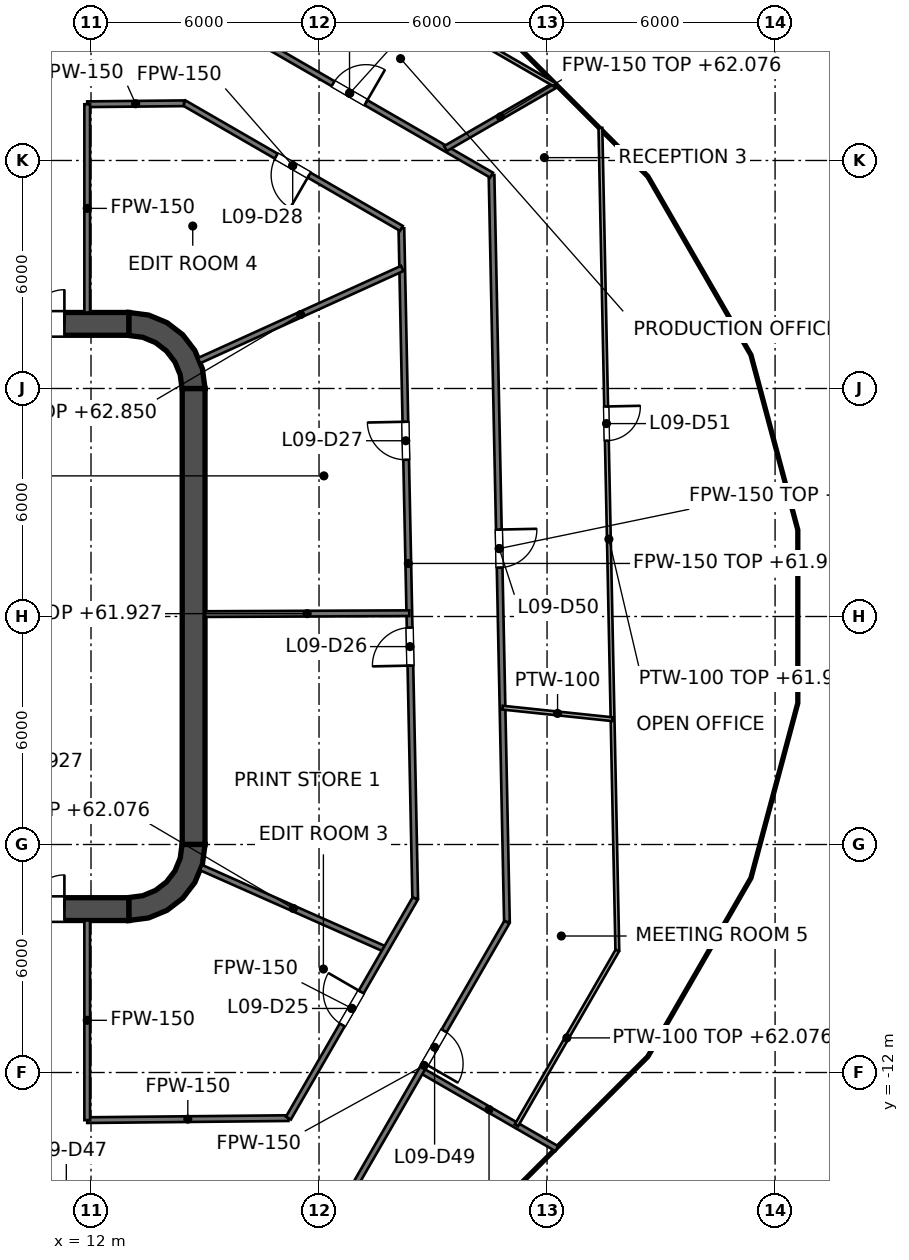
"""IFC4 building model, lengths in metres.
Left out: names, types, materials, properties, quantities, classifications, styles, units other than length and angle.
Written with IfcOpenShell. Run it as: python <this file> out.ifc"""

import sys

from ifc_helpers import new_model, si_unit, direction, frame, frame_2d, origin, place, context, subcontext, project, spatial, polyline, rectangle, outline, extrude, element, fill, save


model = new_model("IFC4")
c1 = context("Model", 3, precision=1e-05, world=origin(), true_north=direction((0.0, 1.0)))
c2 = subcontext(c1, "Body", "Model", "MODEL_VIEW")
j1 = project(units=[si_unit("LENGTHUNIT", "METRE"), si_unit("PLANEANGLEUNIT", "RADIAN")], contexts=[c1])
p1 = place(None, origin())
s1 = spatial("IfcSite", under=j1, at=p1, CompositionType="ELEMENT")
p2 = place(p1, origin())
s2 = spatial("IfcBuilding", under=s1, at=p2, CompositionType="ELEMENT")
p3 = place(p2, frame((0.0, 0.0, 58.8)))
s3 = spatial("IfcBuildingStorey", under=s2, at=p3, CompositionType="ELEMENT", Elevation=58.8)
p4 = place(p3, frame((-13.0, 7.7, 0.0), z_axis=(0.0, 0.0, 1.0), x_axis=(1.0, 0.0, 0.0)))
e1 = element("IfcWall", 1, at=p4, inside=s3, PredefinedType="SHEAR", context=c2, shape_type="SweptSolid", body=[
    extrude(rectangle(XDim=26.0, YDim=0.6, at=frame_2d((13.0, 0.0))), origin(), (0.0, 0.0, 1.0), 4.2),
])
p5 = place(p4, frame((1.7, 0.0, 0.0)))
e2 = element("IfcOpeningElement", 2, at=p5, cuts=e1, PredefinedType="OPENING", context=c2, shape_type="SweptSolid", body=[
    extrude(rectangle(XDim=1.8, YDim=2.1, at=frame_2d((0.9, 1.05))), frame((0.0, 0.3, 0.0), z_axis=(0.0, -1.0, 0.0), x_axis=(1.0, 0.0, 0.0)), (0.0, 0.0, 1.0), 0.6),
])
p6 = place(p4, frame((22.5, 0.0, 0.0)))
e3 = element("IfcOpeningElement", 3, at=p6, cuts=e1, PredefinedType="OPENING", context=c2, shape_type="SweptSolid", body=[
    extrude(rectangle(XDim=1.8, YDim=2.1, at=frame_2d((0.9, 1.05))), frame((0.0, 0.3, 0.0), z_axis=(0.0, -1.0, 0.0), x_axis=(1.0, 0.0, 0.0)), (0.0, 0.0, 1.0), 0.6),
])
p7 = place(p3, frame((-13.0, -7.7, 0.0), z_axis=(0.0, 0.0, 1.0), x_axis=(1.0, 0.0, 0.0)))
e4 = element("IfcWall", 4, at=p7, inside=s3, PredefinedType="SHEAR", context=c2, shape_type="SweptSolid", body=[
    extrude(rectangle(XDim=26.0, YDim=0.6, at=frame_2d((13.0, 0.0))), origin(), (0.0, 0.0, 1.0), 4.2),
])
p8 = place(p7, frame((1.7, 0.0, 0.0)))
e5 = element("IfcOpeningElement", 5, at=p8, cuts=e4, PredefinedType="OPENING", context=c2, shape_type="SweptSolid", body=[
    extrude(rectangle(XDim=1.8, YDim=2.1, at=frame_2d((0.9, 1.05))), frame((0.0, 0.3, 0.0), z_axis=(0.0, -1.0, 0.0), x_axis=(1.0, 0.0, 0.0)), (0.0, 0.0, 1.0), 0.6),
])
p9 = place(p7, frame((22.5, 0.0, 0.0)))
e6 = element("IfcOpeningElement", 6, at=p9, cuts=e4, PredefinedType="OPENING", context=c2, shape_type="SweptSolid", body=[
    extrude(rectangle(XDim=1.8, YDim=2.1, at=frame_2d((0.9, 1.05))), frame((0.0, 0.3, 0.0), z_axis=(0.0, -1.0, 0.0), x_axis=(1.0, 0.0, 0.0)), (0.0, 0.0, 1.0), 0.6),
])
p10 = place(p3, frame((14.7, -6.0, 0.0), z_axis=(0.0, 0.0, 1.0), x_axis=(0.0, 1.0, 0.0)))
e7 = element("IfcWall", 7, at=p10, inside=s3, PredefinedType="SHEAR", context=c2, shape_type="SweptSolid", body=[
    extrude(rectangle(XDim=12.0, YDim=0.6, at=frame_2d((6.0, 0.0))), origin(), (0.0, 0.0, 1.0), 4.2),
])
p11 = place(p3, origin())
e8 = element("IfcWall", 8, at=p11, inside=s3, PredefinedType="SHEAR", context=c2, shape_type="SweptSolid", body=[
    extrude(outline(polyline([(13.0, 8.0), (13.0, 7.395), (13.361, 7.347), (13.698, 7.208), (13.986, 6.986), (14.208, 6.698), (14.347, 6.361), (14.395, 6.0), (15.0, 6.0), (14.932, 6.518), (14.732, 7.0), (14.414, 7.414), (14.0, 7.732), (13.518, 7.932), (13.0, 8.0)])), origin(), (0.0, 0.0, 1.0), 4.2),
])
e9 = element("IfcWall", 9, at=p11, inside=s3, PredefinedType="SHEAR", context=c2, shape_type="SweptSolid", body=[
    extrude(outline(polyline([(15.0, -6.0), (14.395, -6.0), (14.347, -6.361), (14.208, -6.698), (13.986, -6.986), (13.698, -7.208), (13.361, -7.347), (13.0, -7.395), (13.0, -8.0), (13.518, -7.932), (14.0, -7.732), (14.414, -7.414), (14.732, -7.0), (14.932, -6.518), (15.0, -6.0)])), origin(), (0.0, 0.0, 1.0), 4.2),
])
p12 = place(p3, frame((11.8, -7.4, 0.0), z_axis=(0.0, 0.0, 1.0), x_axis=(0.0, 1.0, 0.0)))
e10 = element("IfcWall", 10, at=p12, inside=s3, PredefinedType="SOLIDWALL", context=c2, shape_type="SweptSolid", body=[
    extrude(rectangle(XDim=14.8, YDim=0.4, at=frame_2d((7.4, 0.0))), origin(), (0.0, 0.0, 1.0), 4.05),
])
p13 = place(p12, frame((11.2, 0.0, 0.0)))
e11 = element("IfcOpeningElement", 11, at=p13, cuts=e10, PredefinedType="OPENING", context=c2, shape_type="SweptSolid", body=[
    extrude(rectangle(XDim=1.1, YDim=2.1, at=frame_2d((0.55, 1.05))), frame((0.0, 0.2, 0.0), z_axis=(0.0, -1.0, 0.0), x_axis=(1.0, 0.0, 0.0)), (0.0, 0.0, 1.0), 0.4),
])
p14 = place(p12, frame((8.3, 0.0, 0.0)))
e12 = element("IfcOpeningElement", 12, at=p14, cuts=e10, PredefinedType="OPENING", context=c2, shape_type="SweptSolid", body=[
    extrude(rectangle(XDim=1.1, YDim=2.1, at=frame_2d((0.55, 1.05))), frame((0.0, 0.2, 0.0), z_axis=(0.0, -1.0, 0.0), x_axis=(1.0, 0.0, 0.0)), (0.0, 0.0, 1.0), 0.4),
])
p15 = place(p12, frame((5.4, 0.0, 0.0)))
e13 = element("IfcOpeningElement", 13, at=p15, cuts=e10, PredefinedType="OPENING", context=c2, shape_type="SweptSolid", body=[
    extrude(rectangle(XDim=1.1, YDim=2.1, at=frame_2d((0.55, 1.05))), frame((0.0, 0.2, 0.0), z_axis=(0.0, -1.0, 0.0), x_axis=(1.0, 0.0, 0.0)), (0.0, 0.0, 1.0), 0.4),
])
p16 = place(p12, frame((13.552, 0.0, 0.0)))
e14 = element("IfcOpeningElement", 14, at=p16, cuts=e10, PredefinedType="OPENING", context=c2, shape_type="SweptSolid", body=[
    extrude(rectangle(XDim=0.9, YDim=2.1, at=frame_2d((0.45, 1.05))), frame((0.0, 0.2, 0.0), z_axis=(0.0, -1.0, 0.0), x_axis=(1.0, 0.0, 0.0)), (0.0, 0.0, 1.0), 0.4),
])
p17 = place(p12, frame((0.347, 0.0, 0.0)))
e15 = element("IfcOpeningElement", 15, at=p17, cuts=e10, PredefinedType="OPENING", context=c2, shape_type="SweptSolid", body=[
    extrude(rectangle(XDim=0.9, YDim=2.1, at=frame_2d((0.45, 1.05))), frame((0.0, 0.2, 0.0), z_axis=(0.0, -1.0, 0.0), x_axis=(1.0, 0.0, 0.0)), (0.0, 0.0, 1.0), 0.4),
])
e16 = element("IfcWall", 16, at=p11, inside=s3, PredefinedType="SOLIDWALL", context=c2, shape_type="SweptSolid", body=[
    extrude(outline(polyline([(12.0, -5.675), (12.0, -5.925), (14.15, -5.925), (14.4, -5.925), (14.4, -5.675), (14.4, -3.025), (14.4, -2.775), (14.4, -0.125), (14.4, 0.125), (14.4, 2.775), (14.4, 3.025), (14.4, 5.675), (14.4, 5.925), (14.15, 5.925), (12.0, 5.925), (12.0, 5.675), (14.15, 5.675), (14.15, 3.025), (12.0, 3.025), (12.0, 2.775), (14.15, 2.775), (14.15, 0.125), (12.0, 0.125), (12.0, -0.125), (14.15, -0.125), (14.15, -2.775), (12.0, -2.775), (12.0, -3.025), (14.15, -3.025), (14.15, -5.675), (12.0, -5.675)])), origin(), (0.0, 0.0, 1.0), 4.05),
])
p18 = place(p3, frame((20.167, 10.213, 0.0), z_axis=(0.0, 0.0, 1.0), x_axis=(0.020624730832, -0.999787287616, 0.0)))
e17 = element("IfcWall", 17, at=p18, inside=s3, PredefinedType="PARTITIONING", context=c2, shape_type="SweptSolid", body=[
    extrude(rectangle(XDim=17.637, YDim=0.15, at=frame_2d((8.819, 0.0))), origin(), (0.0, 0.0, 1.0), 3.127),
])
p19 = place(p18, frame((10.508, 0.0, 0.0)))
e18 = element("IfcOpeningElement", 18, at=p19, cuts=e17, PredefinedType="OPENING", context=c2, shape_type="SweptSolid", body=[
    extrude(rectangle(XDim=1.0, YDim=2.1, at=frame_2d((0.5, 1.05))), frame((0.0, 0.075, 0.0), z_axis=(0.0, -1.0, 0.0), x_axis=(1.0, 0.0, 0.0)), (0.0, 0.0, 1.0), 0.15),
])
p20 = place(p18, frame((5.089, 0.0, 0.0)))
e19 = element("IfcOpeningElement", 19, at=p20, cuts=e17, PredefinedType="OPENING", context=c2, shape_type="SweptSolid", body=[
    extrude(rectangle(XDim=1.0, YDim=2.1, at=frame_2d((0.5, 1.05))), frame((0.0, 0.075, 0.0), z_axis=(0.0, -1.0, 0.0), x_axis=(1.0, 0.0, 0.0)), (0.0, 0.0, 1.0), 0.15),
])
p21 = place(p3, frame((22.539, 11.615, 0.0), z_axis=(0.0, 0.0, 1.0), x_axis=(0.020626332176, -0.99978725458, 0.0)))
e20 = element("IfcWall", 20, at=p21, inside=s3, PredefinedType="PARTITIONING", context=c2, shape_type="SweptSolid", body=[
    extrude(rectangle(XDim=19.66, YDim=0.15, at=frame_2d((9.83, 0.0))), origin(), (0.0, 0.0, 1.0), 3.127),
])
p22 = place(p21, frame((9.33, 0.0, 0.0)))
e21 = element("IfcOpeningElement", 21, at=p22, cuts=e20, PredefinedType="OPENING", context=c2, shape_type="SweptSolid", body=[
    extrude(rectangle(XDim=1.0, YDim=2.1, at=frame_2d((0.5, 1.05))), frame((0.0, 0.075, 0.0), z_axis=(0.0, -1.0, 0.0), x_axis=(1.0, 0.0, 0.0)), (0.0, 0.0, 1.0), 0.15),
])
p23 = place(p3, frame((20.69, -11.945, 0.0), z_axis=(0.0, 0.0, 1.0), x_axis=(0.866053314856, -0.49995165349, 0.0)))
e22 = element("IfcWall", 22, at=p23, inside=s3, PredefinedType="PARTITIONING", context=c2, shape_type="SweptSolid", body=[
    extrude(rectangle(XDim=4.119, YDim=0.15, at=frame_2d((2.059, 0.0))), origin(), (0.0, 0.0, 1.0), 3.276),
])
p24 = place(p3, frame((14.448, 13.515, 0.0), z_axis=(0.0, 0.0, 1.0), x_axis=(0.866057537452, -0.499944338725, 0.0)))
e23 = element("IfcWall", 23, at=p24, inside=s3, PredefinedType="PARTITIONING", context=c2, shape_type="SweptSolid", body=[
    extrude(rectangle(XDim=6.604, YDim=0.15, at=frame_2d((3.302, 0.0))), origin(), (0.0, 0.0, 1.0), 3.195),
])
p25 = place(p24, frame((2.801, 0.0, 0.0)))
e24 = element("IfcOpeningElement", 24, at=p25, cuts=e23, PredefinedType="OPENING", context=c2, shape_type="SweptSolid", body=[
    extrude(rectangle(XDim=1.0, YDim=2.1, at=frame_2d((0.5, 1.05))), frame((0.0, 0.075, 0.0), z_axis=(0.0, -1.0, 0.0), x_axis=(1.0, 0.0, 0.0)), (0.0, 0.0, 1.0), 0.15),
])
p26 = place(p3, frame((15.08, 15.921, 0.0), z_axis=(0.0, 0.0, 1.0), x_axis=(0.866045387442, -0.499965385693, 0.0)))
e25 = element("IfcWall", 25, at=p26, inside=s3, PredefinedType="PARTITIONING", context=c2, shape_type="SweptSolid", body=[
    extrude(rectangle(XDim=8.612, YDim=0.15, at=frame_2d((4.306, 0.0))), origin(), (0.0, 0.0, 1.0), 3.195),
])
p27 = place(p26, frame((3.798, 0.0, 0.0)))
e26 = element("IfcOpeningElement", 26, at=p27, cuts=e25, PredefinedType="OPENING", context=c2, shape_type="SweptSolid", body=[
    extrude(rectangle(XDim=1.0, YDim=2.1, at=frame_2d((0.5, 1.05))), frame((0.0, 0.075, 0.0), z_axis=(0.0, -1.0, 0.0), x_axis=(1.0, 0.0, 0.0)), (0.0, 0.0, 1.0), 0.15),
])
p28 = place(p3, frame((14.895, -6.607, 0.0), z_axis=(0.0, 0.0, 1.0), x_axis=(0.914233271379, -0.405188259337, 0.0)))
e27 = element("IfcWall", 27, at=p28, inside=s3, PredefinedType="PARTITIONING", context=c2, shape_type="SweptSolid", body=[
    extrude(rectangle(XDim=5.317, YDim=0.15, at=frame_2d((2.659, 0.0))), origin(), (0.0, 0.0, 1.0), 3.276),
])
p29 = place(p3, frame((15.0, 0.063, 0.0), z_axis=(0.0, 0.0, 1.0), x_axis=(0.999990294223, 0.004405843865, 0.0)))
e28 = element("IfcWall", 28, at=p29, inside=s3, PredefinedType="PARTITIONING", context=c2, shape_type="SweptSolid", body=[
    extrude(rectangle(XDim=5.375, YDim=0.15, at=frame_2d((2.688, 0.0))), origin(), (0.0, 0.0, 1.0), 3.127),
])
p30 = place(p3, frame((11.9, -13.253, 0.0), z_axis=(0.0, 0.0, 1.0), x_axis=(0.999950853109, 0.009914200296, 0.0)))
e29 = element("IfcWall", 29, at=p30, inside=s3, PredefinedType="PARTITIONING", context=c2, shape_type="SweptSolid", body=[
    extrude(rectangle(XDim=5.294, YDim=0.15, at=frame_2d((2.647, 0.0))), origin(), (0.0, 0.0, 1.0), 3.195),
])
p31 = place(p3, frame((11.9, 13.48, 0.0), z_axis=(0.0, 0.0, 1.0), x_axis=(0.999950357576, 0.009964054536, 0.0)))
e30 = element("IfcWall", 30, at=p31, inside=s3, PredefinedType="PARTITIONING", context=c2, shape_type="SweptSolid", body=[
    extrude(rectangle(XDim=2.548, YDim=0.15, at=frame_2d((1.274, 0.0))), origin(), (0.0, 0.0, 1.0), 3.195),
])
p32 = place(p3, frame((14.843, 6.733, 0.0), z_axis=(0.0, 0.0, 1.0), x_axis=(0.910628361306, 0.413226315214, 0.0)))
e31 = element("IfcWall", 31, at=p32, inside=s3, PredefinedType="PARTITIONING", context=c2, shape_type="SweptSolid", body=[
    extrude(rectangle(XDim=5.87, YDim=0.15, at=frame_2d((2.935, 0.0))), origin(), (0.0, 0.0, 1.0), 4.05),
])
p33 = place(p3, frame((21.328, 12.314, 0.0), z_axis=(0.0, 0.0, 1.0), x_axis=(0.865983350263, 0.500072831762, 0.0)))
e32 = element("IfcWall", 32, at=p33, inside=s3, PredefinedType="PARTITIONING", context=c2, shape_type="SweptSolid", body=[
    extrude(rectangle(XDim=3.337, YDim=0.15, at=frame_2d((1.669, 0.0))), origin(), (0.0, 0.0, 1.0), 3.276),
])
p34 = place(p3, frame((18.587, -15.587, 0.0), z_axis=(0.0, 0.0, 1.0), x_axis=(0.500026433136, 0.866010142069, 0.0)))
e33 = element("IfcWall", 33, at=p34, inside=s3, PredefinedType="PARTITIONING", context=c2, shape_type="SweptSolid", body=[
    extrude(rectangle(XDim=8.713, YDim=0.15, at=frame_2d((4.357, 0.0))), origin(), (0.0, 0.0, 1.0), 3.195),
])
p35 = place(p34, frame((4.408, 0.0, 0.0)))
e34 = element("IfcOpeningElement", 34, at=p35, cuts=e33, PredefinedType="OPENING", context=c2, shape_type="SweptSolid", body=[
    extrude(rectangle(XDim=1.0, YDim=2.1, at=frame_2d((0.5, 1.05))), frame((0.0, 0.075, 0.0), z_axis=(0.0, -1.0, 0.0), x_axis=(1.0, 0.0, 0.0)), (0.0, 0.0, 1.0), 0.15),
])
p36 = place(p3, frame((17.194, -13.201, 0.0), z_axis=(0.0, 0.0, 1.0), x_axis=(0.50001062018, 0.866019272134, 0.0)))
e35 = element("IfcWall", 35, at=p36, inside=s3, PredefinedType="PARTITIONING", context=c2, shape_type="SweptSolid", body=[
    extrude(rectangle(XDim=6.674, YDim=0.15, at=frame_2d((3.337, 0.0))), origin(), (0.0, 0.0, 1.0), 3.195),
])
p37 = place(p36, frame((2.833, 0.0, 0.0)))
e36 = element("IfcOpeningElement", 36, at=p37, cuts=e35, PredefinedType="OPENING", context=c2, shape_type="SweptSolid", body=[
    extrude(rectangle(XDim=1.0, YDim=2.1, at=frame_2d((0.5, 1.05))), frame((0.0, 0.075, 0.0), z_axis=(0.0, -1.0, 0.0), x_axis=(1.0, 0.0, 0.0)), (0.0, 0.0, 1.0), 0.15),
])
p38 = place(p3, frame((11.9, -13.253, 0.0), z_axis=(0.0, 0.0, 1.0), x_axis=(0.0, 1.0, 0.0)))
e37 = element("IfcWall", 37, at=p38, inside=s3, PredefinedType="PARTITIONING", context=c2, shape_type="SweptSolid", body=[
    extrude(rectangle(XDim=5.253, YDim=0.15, at=frame_2d((2.626, 0.0))), origin(), (0.0, 0.0, 1.0), 3.195),
])
p39 = place(p3, frame((11.9, 8.0, 0.0), z_axis=(0.0, 0.0, 1.0), x_axis=(0.0, 1.0, 0.0)))
e38 = element("IfcWall", 38, at=p39, inside=s3, PredefinedType="PARTITIONING", context=c2, shape_type="SweptSolid", body=[
    extrude(rectangle(XDim=5.479, YDim=0.15, at=frame_2d((2.74, 0.0))), origin(), (0.0, 0.0, 1.0), 3.195),
])
p40 = place(p3, frame((25.404, 12.858, 0.0), z_axis=(0.0, 0.0, 1.0), x_axis=(0.020579430912, -0.999788221087, 0.0)))
e39 = element("IfcWall", 39, at=p40, inside=s3, PredefinedType="PARTITIONING", context=c2, shape_type="SweptSolid", body=[
    extrude(rectangle(XDim=21.651, YDim=0.1, at=frame_2d((10.825, 0.0))), origin(), (0.0, 0.0, 1.0), 3.127),
])
p41 = place(p40, frame((7.333, 0.0, 0.0)))
e40 = element("IfcOpeningElement", 40, at=p41, cuts=e39, PredefinedType="OPENING", context=c2, shape_type="SweptSolid", body=[
    extrude(rectangle(XDim=0.9, YDim=2.1, at=frame_2d((0.45, 1.05))), frame((0.0, 0.05, 0.0), z_axis=(0.0, -1.0, 0.0), x_axis=(1.0, 0.0, 0.0)), (0.0, 0.0, 1.0), 0.1),
])
p42 = place(p3, frame((15.841, 18.819, 0.0), z_axis=(0.0, 0.0, 1.0), x_axis=(0.866064962815, -0.499931475489, 0.0)))
e41 = element("IfcWall", 41, at=p42, inside=s3, PredefinedType="PARTITIONING", context=c2, shape_type="SweptSolid", body=[
    extrude(rectangle(XDim=9.673, YDim=0.1, at=frame_2d((4.836, 0.0))), origin(), (0.0, 0.0, 1.0), 3.195),
])
p43 = place(p3, frame((22.828, -2.399, 0.0), z_axis=(0.0, 0.0, 1.0), x_axis=(0.994541671448, -0.104340134908, 0.0)))
e42 = element("IfcWall", 42, at=p43, inside=s3, PredefinedType="PARTITIONING", context=c2, shape_type="SweptSolid", body=[
    extrude(rectangle(XDim=2.913, YDim=0.1, at=frame_2d((1.457, 0.0))), origin(), (0.0, 0.0, 1.0), 4.05),
])
p44 = place(p3, frame((23.193, -13.39, 0.0), z_axis=(0.0, 0.0, 1.0), x_axis=(0.500018082969, 0.866014963326, 0.0)))
e43 = element("IfcWall", 43, at=p44, inside=s3, PredefinedType="PARTITIONING", context=c2, shape_type="SweptSolid", body=[
    extrude(rectangle(XDim=5.314, YDim=0.1, at=frame_2d((2.657, 0.0))), origin(), (0.0, 0.0, 1.0), 3.276),
])
p45 = place(p13, origin())
e44 = element("IfcDoor", 44, at=p45, inside=s3, OperationType="DOUBLE_DOOR_SLIDING", PredefinedType="DOOR", context=c2, shape_type="SweptSolid", body=[
    extrude(rectangle(XDim=1.1, YDim=2.1, at=frame_2d((0.55, 1.05))), frame((0.0, 0.025, 0.0), z_axis=(0.0, -1.0, 0.0), x_axis=(1.0, 0.0, 0.0)), (0.0, 0.0, 1.0), 0.05),
])
fill(e11, e44)
p46 = place(p14, origin())
e45 = element("IfcDoor", 45, at=p46, inside=s3, OperationType="DOUBLE_DOOR_SLIDING", PredefinedType="DOOR", context=c2, shape_type="SweptSolid", body=[
    extrude(rectangle(XDim=1.1, YDim=2.1, at=frame_2d((0.55, 1.05))), frame((0.0, 0.025, 0.0), z_axis=(0.0, -1.0, 0.0), x_axis=(1.0, 0.0, 0.0)), (0.0, 0.0, 1.0), 0.05),
])
fill(e12, e45)
p47 = place(p15, origin())
e46 = element("IfcDoor", 46, at=p47, inside=s3, OperationType="DOUBLE_DOOR_SLIDING", PredefinedType="DOOR", context=c2, shape_type="SweptSolid", body=[
    extrude(rectangle(XDim=1.1, YDim=2.1, at=frame_2d((0.55, 1.05))), frame((0.0, 0.025, 0.0), z_axis=(0.0, -1.0, 0.0), x_axis=(1.0, 0.0, 0.0)), (0.0, 0.0, 1.0), 0.05),
])
fill(e13, e46)
p48 = place(p16, origin())
e47 = element("IfcDoor", 47, at=p48, inside=s3, OperationType="SINGLE_SWING_RIGHT", PredefinedType="DOOR", context=c2, shape_type="SweptSolid", body=[
    extrude(rectangle(XDim=0.9, YDim=2.1, at=frame_2d((0.45, 1.05))), frame((0.0, 0.025, 0.0), z_axis=(0.0, -1.0, 0.0), x_axis=(1.0, 0.0, 0.0)), (0.0, 0.0, 1.0), 0.05),
])
fill(e14, e47)
p49 = place(p17, origin())
e48 = element("IfcDoor", 48, at=p49, inside=s3, OperationType="SINGLE_SWING_RIGHT", PredefinedType="DOOR", context=c2, shape_type="SweptSolid", body=[
    extrude(rectangle(XDim=0.9, YDim=2.1, at=frame_2d((0.45, 1.05))), frame((0.0, 0.025, 0.0), z_axis=(0.0, -1.0, 0.0), x_axis=(1.0, 0.0, 0.0)), (0.0, 0.0, 1.0), 0.05),
])
fill(e15, e48)
p50 = place(p6, origin())
e49 = element("IfcDoor", 49, at=p50, inside=s3, OperationType="DOUBLE_DOOR_SINGLE_SWING", PredefinedType="DOOR", context=c2, shape_type="SweptSolid", body=[
    extrude(rectangle(XDim=1.8, YDim=2.1, at=frame_2d((0.9, 1.05))), frame((0.0, 0.025, 0.0), z_axis=(0.0, -1.0, 0.0), x_axis=(1.0, 0.0, 0.0)), (0.0, 0.0, 1.0), 0.05),
])
fill(e3, e49)
p51 = place(p9, origin())
e50 = element("IfcDoor", 50, at=p51, inside=s3, OperationType="DOUBLE_DOOR_SINGLE_SWING", PredefinedType="DOOR", context=c2, shape_type="SweptSolid", body=[
    extrude(rectangle(XDim=1.8, YDim=2.1, at=frame_2d((0.9, 1.05))), frame((0.0, 0.025, 0.0), z_axis=(0.0, -1.0, 0.0), x_axis=(1.0, 0.0, 0.0)), (0.0, 0.0, 1.0), 0.05),
])
fill(e6, e50)
p52 = place(p37, origin())
e51 = element("IfcDoor", 51, at=p52, inside=s3, OperationType="SINGLE_SWING_RIGHT", PredefinedType="DOOR", context=c2, shape_type="SweptSolid", body=[
    extrude(rectangle(XDim=1.0, YDim=2.1, at=frame_2d((0.5, 1.05))), frame((0.0, 0.025, 0.0), z_axis=(0.0, -1.0, 0.0), x_axis=(1.0, 0.0, 0.0)), (0.0, 0.0, 1.0), 0.05),
])
fill(e36, e51)
p53 = place(p19, origin())
e52 = element("IfcDoor", 52, at=p53, inside=s3, OperationType="SINGLE_SWING_RIGHT", PredefinedType="DOOR", context=c2, shape_type="SweptSolid", body=[
    extrude(rectangle(XDim=1.0, YDim=2.1, at=frame_2d((0.5, 1.05))), frame((0.0, 0.025, 0.0), z_axis=(0.0, -1.0, 0.0), x_axis=(1.0, 0.0, 0.0)), (0.0, 0.0, 1.0), 0.05),
])
fill(e18, e52)
p54 = place(p20, origin())
e53 = element("IfcDoor", 53, at=p54, inside=s3, OperationType="SINGLE_SWING_LEFT", PredefinedType="DOOR", context=c2, shape_type="SweptSolid", body=[
    extrude(rectangle(XDim=1.0, YDim=2.1, at=frame_2d((0.5, 1.05))), frame((0.0, 0.025, 0.0), z_axis=(0.0, -1.0, 0.0), x_axis=(1.0, 0.0, 0.0)), (0.0, 0.0, 1.0), 0.05),
])
fill(e19, e53)
p55 = place(p25, origin())
e54 = element("IfcDoor", 54, at=p55, inside=s3, OperationType="SINGLE_SWING_RIGHT", PredefinedType="DOOR", context=c2, shape_type="SweptSolid", body=[
    extrude(rectangle(XDim=1.0, YDim=2.1, at=frame_2d((0.5, 1.05))), frame((0.0, 0.025, 0.0), z_axis=(0.0, -1.0, 0.0), x_axis=(1.0, 0.0, 0.0)), (0.0, 0.0, 1.0), 0.05),
])
fill(e24, e54)
p56 = place(p35, origin())
e55 = element("IfcDoor", 55, at=p56, inside=s3, OperationType="SINGLE_SWING_LEFT", PredefinedType="DOOR", context=c2, shape_type="SweptSolid", body=[
    extrude(rectangle(XDim=1.0, YDim=2.1, at=frame_2d((0.5, 1.05))), frame((0.0, 0.025, 0.0), z_axis=(0.0, -1.0, 0.0), x_axis=(1.0, 0.0, 0.0)), (0.0, 0.0, 1.0), 0.05),
])
fill(e34, e55)
p57 = place(p22, origin())
e56 = element("IfcDoor", 56, at=p57, inside=s3, OperationType="SINGLE_SWING_LEFT", PredefinedType="DOOR", context=c2, shape_type="SweptSolid", body=[
    extrude(rectangle(XDim=1.0, YDim=2.1, at=frame_2d((0.5, 1.05))), frame((0.0, 0.025, 0.0), z_axis=(0.0, -1.0, 0.0), x_axis=(1.0, 0.0, 0.0)), (0.0, 0.0, 1.0), 0.05),
])
fill(e21, e56)
p58 = place(p41, origin())
e57 = element("IfcDoor", 57, at=p58, inside=s3, OperationType="SINGLE_SWING_LEFT", PredefinedType="DOOR", context=c2, shape_type="SweptSolid", body=[
    extrude(rectangle(XDim=0.9, YDim=2.1, at=frame_2d((0.45, 1.05))), frame((0.0, 0.025, 0.0), z_axis=(0.0, -1.0, 0.0), x_axis=(1.0, 0.0, 0.0)), (0.0, 0.0, 1.0), 0.05),
])
fill(e40, e57)
p59 = place(p27, origin())
e58 = element("IfcDoor", 58, at=p59, inside=s3, OperationType="SINGLE_SWING_RIGHT", PredefinedType="DOOR", context=c2, shape_type="SweptSolid", body=[
    extrude(rectangle(XDim=1.0, YDim=2.1, at=frame_2d((0.5, 1.05))), frame((0.0, 0.025, 0.0), z_axis=(0.0, -1.0, 0.0), x_axis=(1.0, 0.0, 0.0)), (0.0, 0.0, 1.0), 0.05),
])
fill(e26, e58)
save(model, sys.argv[1])
